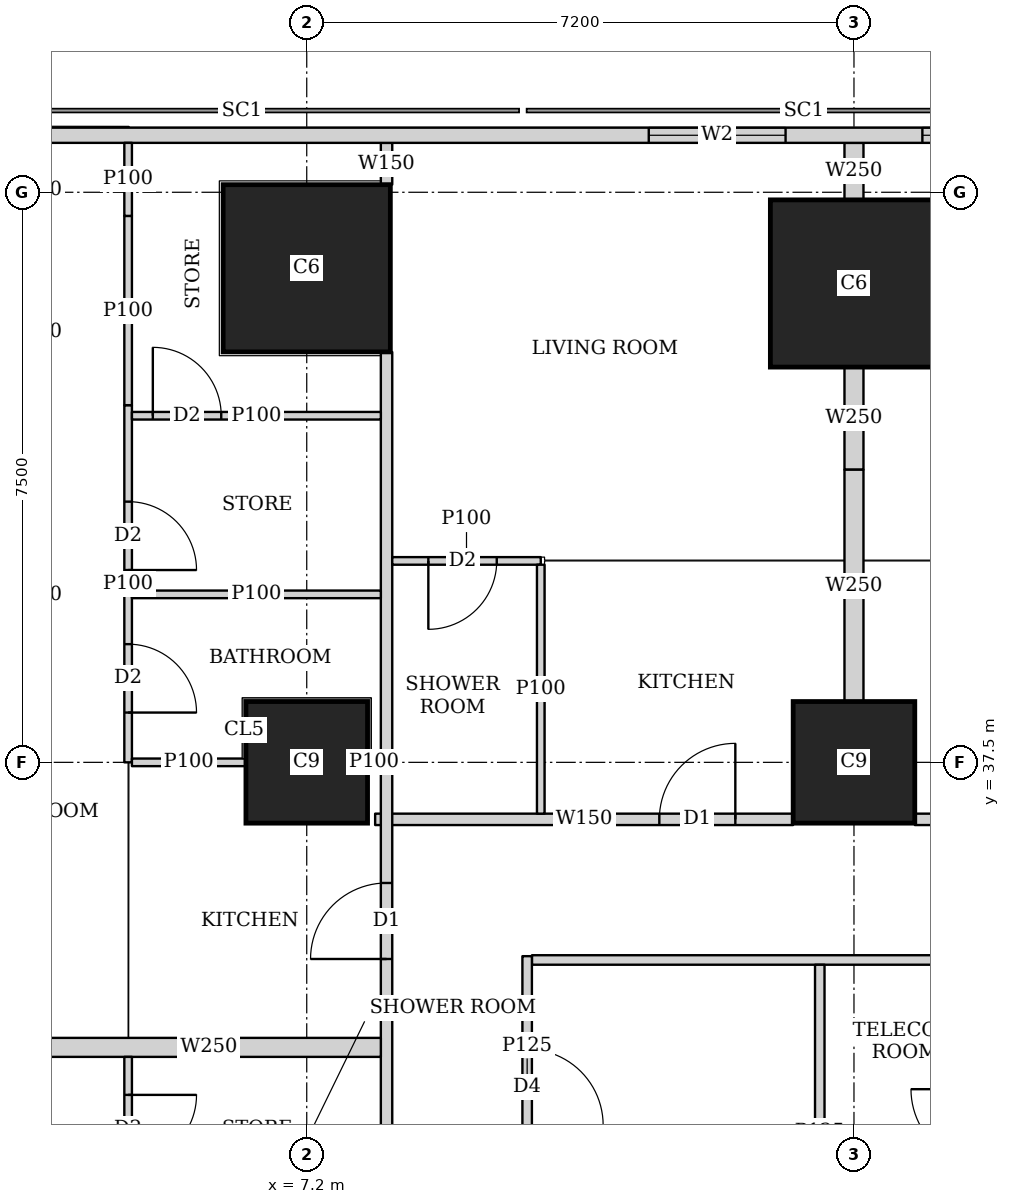
"""IFC4 building model, lengths in metres.
Left out: names, types, materials, properties, quantities, classifications, styles, units other than length and angle.
Written with IfcOpenShell. Run it as: python <this file> out.ifc"""

import sys

from ifc_helpers import new_model, si_unit, direction, frame, frame_2d, origin, origin_2d, place, context, subcontext, project, spatial, rectangle, extrude, element, fill, save


model = new_model("IFC4")
c1 = context("Model", 3, precision=1e-05, world=origin(), true_north=direction((0.0, 1.0)))
c2 = subcontext(c1, "Body", "Model", "MODEL_VIEW")
j1 = project(units=[si_unit("LENGTHUNIT", "METRE"), si_unit("PLANEANGLEUNIT", "RADIAN")], contexts=[c1])
p1 = place(None, origin())
s1 = spatial("IfcSite", under=j1, at=p1, CompositionType="ELEMENT")
p2 = place(p1, origin())
s2 = spatial("IfcBuilding", under=s1, at=p2, CompositionType="ELEMENT")
p3 = place(p2, frame((0.0, 0.0, 77.9)))
s3 = spatial("IfcBuildingStorey", under=s2, at=p3, CompositionType="ELEMENT", Elevation=77.9)
for number, where, z_axis, x_axis in (
    (1, (7.2, 37.5, 0.0), (0.0, 0.0, 1.0), (1.0, 0.0, 0.0)),
    (2, (14.4, 37.5, 0.0), (0.0, 0.0, 1.0), (1.0, 0.0, 0.0)),
):
    element("IfcColumn", number, at=place(p3, frame(where, z_axis=z_axis, x_axis=x_axis)), inside=s3, PredefinedType="COLUMN", context=c2, shape_type="SweptSolid", body=[
        extrude(rectangle(XDim=1.6, YDim=1.6, at=origin_2d()), origin(), (0.0, 0.0, 1.0), 3.75),
    ])
for number, where, z_axis, x_axis in (
    (3, (7.2, 44.0, 0.0), (0.0, 0.0, 1.0), (1.0, 0.0, 0.0)),
    (4, (14.4, 43.8, 0.0), (0.0, 0.0, 1.0), (1.0, 0.0, 0.0)),
):
    element("IfcColumn", number, at=place(p3, frame(where, z_axis=z_axis, x_axis=x_axis)), inside=s3, PredefinedType="COLUMN", context=c2, shape_type="SweptSolid", body=[
        extrude(rectangle(XDim=2.2, YDim=2.2, at=origin_2d()), origin(), (0.0, 0.0, 1.0), 3.75),
    ])
p4 = place(p3, frame((40.106, 45.75, 0.0), z_axis=(0.0, 0.0, 1.0), x_axis=(-1.0, 0.0, 0.0)))
e5 = element("IfcWall", 5, at=p4, inside=s3, PredefinedType="SOLIDWALL", context=c2, shape_type="SweptSolid", body=[
    extrude(rectangle(XDim=37.943, YDim=0.2, at=frame_2d((18.971, 0.0))), origin(), (0.0, 0.0, 1.0), 3.5),
])
p5 = place(p4, frame((8.606, 0.0, 0.9)))
e6 = element("IfcOpeningElement", 6, at=p5, cuts=e5, PredefinedType="OPENING", context=c2, shape_type="SweptSolid", body=[
    extrude(rectangle(XDim=1.8, YDim=1.5, at=frame_2d((0.9, 0.75))), frame((0.0, 0.11, 0.0), z_axis=(0.0, -1.0, 0.0), x_axis=(1.0, 0.0, 0.0)), (0.0, 0.0, 1.0), 0.22),
])
p6 = place(p4, frame((12.206, 0.0, 0.9)))
e7 = element("IfcOpeningElement", 7, at=p6, cuts=e5, PredefinedType="OPENING", context=c2, shape_type="SweptSolid", body=[
    extrude(rectangle(XDim=1.8, YDim=1.5, at=frame_2d((0.9, 0.75))), frame((0.0, 0.11, 0.0), z_axis=(0.0, -1.0, 0.0), x_axis=(1.0, 0.0, 0.0)), (0.0, 0.0, 1.0), 0.22),
])
p7 = place(p4, frame((15.806, 0.0, 0.9)))
e8 = element("IfcOpeningElement", 8, at=p7, cuts=e5, PredefinedType="OPENING", context=c2, shape_type="SweptSolid", body=[
    extrude(rectangle(XDim=1.8, YDim=1.5, at=frame_2d((0.9, 0.75))), frame((0.0, 0.11, 0.0), z_axis=(0.0, -1.0, 0.0), x_axis=(1.0, 0.0, 0.0)), (0.0, 0.0, 1.0), 0.22),
])
p8 = place(p4, frame((19.406, 0.0, 0.9)))
e9 = element("IfcOpeningElement", 9, at=p8, cuts=e5, PredefinedType="OPENING", context=c2, shape_type="SweptSolid", body=[
    extrude(rectangle(XDim=1.8, YDim=1.5, at=frame_2d((0.9, 0.75))), frame((0.0, 0.11, 0.0), z_axis=(0.0, -1.0, 0.0), x_axis=(1.0, 0.0, 0.0)), (0.0, 0.0, 1.0), 0.22),
])
p9 = place(p4, frame((23.006, 0.0, 0.9)))
e10 = element("IfcOpeningElement", 10, at=p9, cuts=e5, PredefinedType="OPENING", context=c2, shape_type="SweptSolid", body=[
    extrude(rectangle(XDim=1.8, YDim=1.5, at=frame_2d((0.9, 0.75))), frame((0.0, 0.11, 0.0), z_axis=(0.0, -1.0, 0.0), x_axis=(1.0, 0.0, 0.0)), (0.0, 0.0, 1.0), 0.22),
])
p10 = place(p4, frame((26.606, 0.0, 0.9)))
e11 = element("IfcOpeningElement", 11, at=p10, cuts=e5, PredefinedType="OPENING", context=c2, shape_type="SweptSolid", body=[
    extrude(rectangle(XDim=1.8, YDim=1.5, at=frame_2d((0.9, 0.75))), frame((0.0, 0.11, 0.0), z_axis=(0.0, -1.0, 0.0), x_axis=(1.0, 0.0, 0.0)), (0.0, 0.0, 1.0), 0.22),
])
p11 = place(p3, frame((8.25, 2.126, 0.0), z_axis=(0.0, 0.0, 1.0), x_axis=(0.0, 1.0, 0.0)))
e12 = element("IfcWall", 12, at=p11, inside=s3, PredefinedType="SOLIDWALL", context=c2, shape_type="SweptSolid", body=[
    extrude(rectangle(XDim=40.773, YDim=0.15, at=frame_2d((20.386, 0.0))), origin(), (0.0, 0.0, 1.0), 3.5),
])
p12 = place(p11, frame((17.787, 0.0, 0.0)))
e13 = element("IfcOpeningElement", 13, at=p12, cuts=e12, PredefinedType="OPENING", context=c2, shape_type="SweptSolid", body=[
    extrude(rectangle(XDim=1.0, YDim=2.1, at=frame_2d((0.5, 1.05))), frame((0.0, 0.085, 0.0), z_axis=(0.0, -1.0, 0.0), x_axis=(1.0, 0.0, 0.0)), (0.0, 0.0, 1.0), 0.17),
])
p13 = place(p11, frame((21.962, 0.0, 0.0)))
e14 = element("IfcOpeningElement", 14, at=p13, cuts=e12, PredefinedType="OPENING", context=c2, shape_type="SweptSolid", body=[
    extrude(rectangle(XDim=1.0, YDim=2.1, at=frame_2d((0.5, 1.05))), frame((0.0, 0.085, 0.0), z_axis=(0.0, -1.0, 0.0), x_axis=(1.0, 0.0, 0.0)), (0.0, 0.0, 1.0), 0.17),
])
p14 = place(p11, frame((32.787, 0.0, 0.0)))
e15 = element("IfcOpeningElement", 15, at=p14, cuts=e12, PredefinedType="OPENING", context=c2, shape_type="SweptSolid", body=[
    extrude(rectangle(XDim=1.0, YDim=2.1, at=frame_2d((0.5, 1.05))), frame((0.0, 0.085, 0.0), z_axis=(0.0, -1.0, 0.0), x_axis=(1.0, 0.0, 0.0)), (0.0, 0.0, 1.0), 0.17),
])
p15 = place(p3, frame((8.25, 45.101, 0.0), z_axis=(0.0, 0.0, 1.0), x_axis=(0.0, 1.0, 0.0)))
e16 = element("IfcWall", 16, at=p15, inside=s3, PredefinedType="SOLIDWALL", context=c2, shape_type="SweptSolid", body=[
    extrude(rectangle(XDim=0.549, YDim=0.15, at=frame_2d((0.274, 0.0))), origin(), (0.0, 0.0, 1.0), 3.5),
])
p16 = place(p3, frame((8.1, 36.75, 0.0), z_axis=(0.0, 0.0, 1.0), x_axis=(1.0, 0.0, 0.0)))
e17 = element("IfcWall", 17, at=p16, inside=s3, PredefinedType="SOLIDWALL", context=c2, shape_type="SweptSolid", body=[
    extrude(rectangle(XDim=5.499, YDim=0.15, at=frame_2d((2.75, 0.0))), origin(), (0.0, 0.0, 1.0), 3.5),
])
p17 = place(p16, frame((3.739, 0.0, 0.0)))
e18 = element("IfcOpeningElement", 18, at=p17, cuts=e17, PredefinedType="OPENING", context=c2, shape_type="SweptSolid", body=[
    extrude(rectangle(XDim=1.0, YDim=2.1, at=frame_2d((0.5, 1.05))), frame((0.0, 0.085, 0.0), z_axis=(0.0, -1.0, 0.0), x_axis=(1.0, 0.0, 0.0)), (0.0, 0.0, 1.0), 0.17),
])
p18 = place(p3, frame((15.201, 36.75, 0.0), z_axis=(0.0, 0.0, 1.0), x_axis=(1.0, 0.0, 0.0)))
e19 = element("IfcWall", 19, at=p18, inside=s3, PredefinedType="SOLIDWALL", context=c2, shape_type="SweptSolid", body=[
    extrude(rectangle(XDim=5.398, YDim=0.15, at=frame_2d((2.699, 0.0))), origin(), (0.0, 0.0, 1.0), 3.5),
])
p19 = place(p18, frame((0.699, 0.0, 0.0)))
e20 = element("IfcOpeningElement", 20, at=p19, cuts=e19, PredefinedType="OPENING", context=c2, shape_type="SweptSolid", body=[
    extrude(rectangle(XDim=1.0, YDim=2.1, at=frame_2d((0.5, 1.05))), frame((0.0, 0.085, 0.0), z_axis=(0.0, -1.0, 0.0), x_axis=(1.0, 0.0, 0.0)), (0.0, 0.0, 1.0), 0.17),
])
p20 = place(p3, frame((4.85, 26.25, 0.0), z_axis=(0.0, 0.0, 1.0), x_axis=(0.0, 1.0, 0.0)))
e21 = element("IfcWall", 21, at=p20, inside=s3, PredefinedType="PARTITIONING", context=c2, shape_type="SweptSolid", body=[
    extrude(rectangle(XDim=7.375, YDim=0.1, at=frame_2d((3.688, 0.0))), origin(), (0.0, 0.0, 1.0), 3.5),
])
p21 = place(p20, frame((0.655, 0.0, 0.0)))
e22 = element("IfcOpeningElement", 22, at=p21, cuts=e21, PredefinedType="OPENING", context=c2, shape_type="SweptSolid", body=[
    extrude(rectangle(XDim=0.9, YDim=2.1, at=frame_2d((0.45, 1.05))), frame((0.0, 0.06, 0.0), z_axis=(0.0, -1.0, 0.0), x_axis=(1.0, 0.0, 0.0)), (0.0, 0.0, 1.0), 0.12),
])
p22 = place(p20, frame((4.1, 0.0, 0.0)))
e23 = element("IfcOpeningElement", 23, at=p22, cuts=e21, PredefinedType="OPENING", context=c2, shape_type="SweptSolid", body=[
    extrude(rectangle(XDim=0.9, YDim=2.1, at=frame_2d((0.45, 1.05))), frame((0.0, 0.06, 0.0), z_axis=(0.0, -1.0, 0.0), x_axis=(1.0, 0.0, 0.0)), (0.0, 0.0, 1.0), 0.12),
])
p23 = place(p20, frame((2.53, 0.0, 0.0)))
e24 = element("IfcOpeningElement", 24, at=p23, cuts=e21, PredefinedType="OPENING", context=c2, shape_type="SweptSolid", body=[
    extrude(rectangle(XDim=0.9, YDim=2.1, at=frame_2d((0.45, 1.05))), frame((0.0, 0.06, 0.0), z_axis=(0.0, -1.0, 0.0), x_axis=(1.0, 0.0, 0.0)), (0.0, 0.0, 1.0), 0.12),
])
p24 = place(p20, frame((5.975, 0.0, 0.0)))
e25 = element("IfcOpeningElement", 25, at=p24, cuts=e21, PredefinedType="OPENING", context=c2, shape_type="SweptSolid", body=[
    extrude(rectangle(XDim=0.9, YDim=2.1, at=frame_2d((0.45, 1.05))), frame((0.0, 0.06, 0.0), z_axis=(0.0, -1.0, 0.0), x_axis=(1.0, 0.0, 0.0)), (0.0, 0.0, 1.0), 0.12),
])
p25 = place(p3, frame((4.85, 37.5, 0.0), z_axis=(0.0, 0.0, 1.0), x_axis=(0.0, 1.0, 0.0)))
e26 = element("IfcWall", 26, at=p25, inside=s3, PredefinedType="PARTITIONING", context=c2, shape_type="SweptSolid", body=[
    extrude(rectangle(XDim=4.699, YDim=0.1, at=frame_2d((2.35, 0.0))), origin(), (0.0, 0.0, 1.0), 3.5),
])
p26 = place(p25, frame((0.655, 0.0, 0.0)))
e27 = element("IfcOpeningElement", 27, at=p26, cuts=e26, PredefinedType="OPENING", context=c2, shape_type="SweptSolid", body=[
    extrude(rectangle(XDim=0.9, YDim=2.1, at=frame_2d((0.45, 1.05))), frame((0.0, 0.06, 0.0), z_axis=(0.0, -1.0, 0.0), x_axis=(1.0, 0.0, 0.0)), (0.0, 0.0, 1.0), 0.12),
])
p27 = place(p25, frame((2.53, 0.0, 0.0)))
e28 = element("IfcOpeningElement", 28, at=p27, cuts=e26, PredefinedType="OPENING", context=c2, shape_type="SweptSolid", body=[
    extrude(rectangle(XDim=0.9, YDim=2.1, at=frame_2d((0.45, 1.05))), frame((0.0, 0.06, 0.0), z_axis=(0.0, -1.0, 0.0), x_axis=(1.0, 0.0, 0.0)), (0.0, 0.0, 1.0), 0.12),
])
p28 = place(p3, frame((4.85, 42.199, 0.0), z_axis=(0.0, 0.0, 1.0), x_axis=(0.0, 1.0, 0.0)))
e29 = element("IfcWall", 29, at=p28, inside=s3, PredefinedType="PARTITIONING", context=c2, shape_type="SweptSolid", body=[
    extrude(rectangle(XDim=2.49, YDim=0.1, at=frame_2d((1.245, 0.0))), origin(), (0.0, 0.0, 1.0), 2.05),
])
p29 = place(p3, frame((4.85, 44.689, 0.0), z_axis=(0.0, 0.0, 1.0), x_axis=(0.0, 1.0, 0.0)))
e30 = element("IfcWall", 30, at=p29, inside=s3, PredefinedType="PARTITIONING", context=c2, shape_type="SweptSolid", body=[
    extrude(rectangle(XDim=0.961, YDim=0.1, at=frame_2d((0.48, 0.0))), origin(), (0.0, 0.0, 1.0), 3.5),
])
p30 = place(p3, frame((4.9, 37.5, 0.0), z_axis=(0.0, 0.0, 1.0), x_axis=(1.0, 0.0, 0.0)))
e31 = element("IfcWall", 31, at=p30, inside=s3, PredefinedType="PARTITIONING", context=c2, shape_type="SweptSolid", body=[
    extrude(rectangle(XDim=1.499, YDim=0.1, at=frame_2d((0.75, 0.0))), origin(), (0.0, 0.0, 1.0), 3.5),
])
p31 = place(p3, frame((8.001, 37.5, 0.0), z_axis=(0.0, 0.0, 1.0), x_axis=(1.0, 0.0, 0.0)))
e32 = element("IfcWall", 32, at=p31, inside=s3, PredefinedType="PARTITIONING", context=c2, shape_type="SweptSolid", body=[
    extrude(rectangle(XDim=0.174, YDim=0.1, at=frame_2d((0.087, 0.0))), origin(), (0.0, 0.0, 1.0), 3.5),
])
p32 = place(p3, frame((4.9, 39.71, 0.0), z_axis=(0.0, 0.0, 1.0), x_axis=(1.0, 0.0, 0.0)))
e33 = element("IfcWall", 33, at=p32, inside=s3, PredefinedType="PARTITIONING", context=c2, shape_type="SweptSolid", body=[
    extrude(rectangle(XDim=3.275, YDim=0.1, at=frame_2d((1.638, 0.0))), origin(), (0.0, 0.0, 1.0), 3.5),
])
p33 = place(p3, frame((3.65, 33.75, 0.0), z_axis=(0.0, 0.0, 1.0), x_axis=(1.0, 0.0, 0.0)))
e34 = element("IfcWall", 34, at=p33, inside=s3, PredefinedType="SOLIDWALL", context=c2, shape_type="SweptSolid", body=[
    extrude(rectangle(XDim=4.525, YDim=0.25, at=frame_2d((2.263, 0.0))), origin(), (0.0, 0.0, 1.0), 3.5),
])
p34 = place(p3, frame((8.325, 40.15, 0.0), z_axis=(0.0, 0.0, 1.0), x_axis=(1.0, 0.0, 0.0)))
e35 = element("IfcWall", 35, at=p34, inside=s3, PredefinedType="PARTITIONING", context=c2, shape_type="SweptSolid", body=[
    extrude(rectangle(XDim=1.954, YDim=0.1, at=frame_2d((0.977, 0.0))), origin(), (0.0, 0.0, 1.0), 3.5),
])
p35 = place(p34, frame((0.475, 0.0, 0.0)))
e36 = element("IfcOpeningElement", 36, at=p35, cuts=e35, PredefinedType="OPENING", context=c2, shape_type="SweptSolid", body=[
    extrude(rectangle(XDim=0.9, YDim=2.1, at=frame_2d((0.45, 1.05))), frame((0.0, 0.06, 0.0), z_axis=(0.0, -1.0, 0.0), x_axis=(1.0, 0.0, 0.0)), (0.0, 0.0, 1.0), 0.12),
])
p36 = place(p3, frame((10.279, 36.825, 0.0), z_axis=(0.0, 0.0, 1.0), x_axis=(0.0, 1.0, 0.0)))
e37 = element("IfcWall", 37, at=p36, inside=s3, PredefinedType="PARTITIONING", context=c2, shape_type="SweptSolid", body=[
    extrude(rectangle(XDim=3.275, YDim=0.1, at=frame_2d((1.638, 0.0))), origin(), (0.0, 0.0, 1.0), 3.5),
])
p37 = place(p3, frame((14.4, 41.35, 0.0), z_axis=(0.0, 0.0, 1.0), x_axis=(0.0, 1.0, 0.0)))
e38 = element("IfcWall", 38, at=p37, inside=s3, PredefinedType="SOLIDWALL", context=c2, shape_type="SweptSolid", body=[
    extrude(rectangle(XDim=1.349, YDim=0.25, at=frame_2d((0.674, 0.0))), origin(), (0.0, 0.0, 1.0), 3.5),
])
p38 = place(p3, frame((14.4, 44.901, 0.0), z_axis=(0.0, 0.0, 1.0), x_axis=(0.0, 1.0, 0.0)))
e39 = element("IfcWall", 39, at=p38, inside=s3, PredefinedType="SOLIDWALL", context=c2, shape_type="SweptSolid", body=[
    extrude(rectangle(XDim=0.749, YDim=0.25, at=frame_2d((0.375, 0.0))), origin(), (0.0, 0.0, 1.0), 3.5),
])
p39 = place(p3, frame((14.4, 38.301, 0.0), z_axis=(0.0, 0.0, 1.0), x_axis=(0.0, 1.0, 0.0)))
e40 = element("IfcWall", 40, at=p39, inside=s3, PredefinedType="SOLIDWALL", context=c2, shape_type="SweptSolid", body=[
    extrude(rectangle(XDim=3.049, YDim=0.25, at=frame_2d((1.524, 0.0))), origin(), (0.0, 0.0, 1.0), 3.5),
])
p40 = place(p3, frame((8.175, 42.06, 0.0), z_axis=(0.0, 0.0, 1.0), x_axis=(-1.0, 0.0, 0.0)))
e41 = element("IfcWall", 41, at=p40, inside=s3, PredefinedType="PARTITIONING", context=c2, shape_type="SweptSolid", body=[
    extrude(rectangle(XDim=3.275, YDim=0.1, at=frame_2d((1.638, 0.0))), origin(), (0.0, 0.0, 1.0), 3.5),
])
p41 = place(p40, frame((2.1, 0.0, 0.0)))
e42 = element("IfcOpeningElement", 42, at=p41, cuts=e41, PredefinedType="OPENING", context=c2, shape_type="SweptSolid", body=[
    extrude(rectangle(XDim=0.9, YDim=2.1, at=frame_2d((0.45, 1.05))), frame((0.0, 0.06, 0.0), z_axis=(0.0, -1.0, 0.0), x_axis=(1.0, 0.0, 0.0)), (0.0, 0.0, 1.0), 0.12),
])
p42 = place(p3, frame((10.1, 31.5, 0.0), z_axis=(0.0, 0.0, 1.0), x_axis=(0.0, 1.0, 0.0)))
e43 = element("IfcWall", 43, at=p42, inside=s3, PredefinedType="PARTITIONING", context=c2, shape_type="SweptSolid", body=[
    extrude(rectangle(XDim=3.45, YDim=0.125, at=frame_2d((1.725, 0.0))), origin(), (0.0, 0.0, 1.0), 3.5),
])
p43 = place(p42, frame((1.225, 0.0, 0.0)))
e44 = element("IfcOpeningElement", 44, at=p43, cuts=e43, PredefinedType="OPENING", context=c2, shape_type="SweptSolid", body=[
    extrude(rectangle(XDim=1.0, YDim=2.1, at=frame_2d((0.5, 1.05))), frame((0.0, 0.073, 0.0), z_axis=(0.0, -1.0, 0.0), x_axis=(1.0, 0.0, 0.0)), (0.0, 0.0, 1.0), 0.145),
])
p44 = place(p3, frame((13.95, 30.45, 0.0), z_axis=(0.0, 0.0, 1.0), x_axis=(0.0, 1.0, 0.0)))
e45 = element("IfcWall", 45, at=p44, inside=s3, PredefinedType="PARTITIONING", context=c2, shape_type="SweptSolid", body=[
    extrude(rectangle(XDim=4.387, YDim=0.125, at=frame_2d((2.193, 0.0))), origin(), (0.0, 0.0, 1.0), 3.5),
])
p45 = place(p3, frame((10.163, 34.9, 0.0), z_axis=(0.0, 0.0, 1.0), x_axis=(1.0, 0.0, 0.0)))
e46 = element("IfcWall", 46, at=p45, inside=s3, PredefinedType="PARTITIONING", context=c2, shape_type="SweptSolid", body=[
    extrude(rectangle(XDim=11.287, YDim=0.125, at=frame_2d((5.644, 0.0))), origin(), (0.0, 0.0, 1.0), 3.5),
])
p46 = place(p45, frame((7.737, 0.0, 0.0)))
e47 = element("IfcOpeningElement", 47, at=p46, cuts=e46, PredefinedType="OPENING", context=c2, shape_type="SweptSolid", body=[
    extrude(rectangle(XDim=1.8, YDim=2.1, at=frame_2d((0.9, 1.05))), frame((0.0, 0.073, 0.0), z_axis=(0.0, -1.0, 0.0), x_axis=(1.0, 0.0, 0.0)), (0.0, 0.0, 1.0), 0.145),
])
p47 = place(p9, origin())
e48 = element("IfcWindow", 48, at=p47, inside=s3, PartitioningType="SINGLE_PANEL", PredefinedType="WINDOW", context=c2, shape_type="SweptSolid", body=[
    extrude(rectangle(XDim=1.8, YDim=1.5, at=frame_2d((0.9, 0.75))), frame((0.0, 0.03, 0.0), z_axis=(0.0, -1.0, 0.0), x_axis=(1.0, 0.0, 0.0)), (0.0, 0.0, 1.0), 0.06),
])
fill(e10, e48)
p48 = place(p10, origin())
e49 = element("IfcWindow", 49, at=p48, inside=s3, PartitioningType="SINGLE_PANEL", PredefinedType="WINDOW", context=c2, shape_type="SweptSolid", body=[
    extrude(rectangle(XDim=1.8, YDim=1.5, at=frame_2d((0.9, 0.75))), frame((0.0, 0.03, 0.0), z_axis=(0.0, -1.0, 0.0), x_axis=(1.0, 0.0, 0.0)), (0.0, 0.0, 1.0), 0.06),
])
fill(e11, e49)
p49 = place(p24, origin())
e50 = element("IfcDoor", 50, at=p49, inside=s3, OperationType="SINGLE_SWING_LEFT", PredefinedType="DOOR", context=c2, shape_type="SweptSolid", body=[
    extrude(rectangle(XDim=0.9, YDim=2.1, at=frame_2d((0.45, 1.05))), frame((0.0, 0.025, 0.0), z_axis=(0.0, -1.0, 0.0), x_axis=(1.0, 0.0, 0.0)), (0.0, 0.0, 1.0), 0.05),
])
fill(e25, e50)
p50 = place(p26, origin())
e51 = element("IfcDoor", 51, at=p50, inside=s3, OperationType="SINGLE_SWING_RIGHT", PredefinedType="DOOR", context=c2, shape_type="SweptSolid", body=[
    extrude(rectangle(XDim=0.9, YDim=2.1, at=frame_2d((0.45, 1.05))), frame((0.0, 0.025, 0.0), z_axis=(0.0, -1.0, 0.0), x_axis=(1.0, 0.0, 0.0)), (0.0, 0.0, 1.0), 0.05),
])
fill(e27, e51)
p51 = place(p27, origin())
e52 = element("IfcDoor", 52, at=p51, inside=s3, OperationType="SINGLE_SWING_RIGHT", PredefinedType="DOOR", context=c2, shape_type="SweptSolid", body=[
    extrude(rectangle(XDim=0.9, YDim=2.1, at=frame_2d((0.45, 1.05))), frame((0.0, 0.025, 0.0), z_axis=(0.0, -1.0, 0.0), x_axis=(1.0, 0.0, 0.0)), (0.0, 0.0, 1.0), 0.05),
])
fill(e28, e52)
p52 = place(p14, origin())
e53 = element("IfcDoor", 53, at=p52, inside=s3, OperationType="SINGLE_SWING_LEFT", PredefinedType="DOOR", context=c2, shape_type="SweptSolid", body=[
    extrude(rectangle(XDim=1.0, YDim=2.1, at=frame_2d((0.5, 1.05))), frame((0.0, 0.025, 0.0), z_axis=(0.0, -1.0, 0.0), x_axis=(1.0, 0.0, 0.0)), (0.0, 0.0, 1.0), 0.05),
])
fill(e15, e53)
p53 = place(p35, origin())
e54 = element("IfcDoor", 54, at=p53, inside=s3, OperationType="SINGLE_SWING_RIGHT", PredefinedType="DOOR", context=c2, shape_type="SweptSolid", body=[
    extrude(rectangle(XDim=0.9, YDim=2.1, at=frame_2d((0.45, 1.05))), frame((0.0, 0.025, 0.0), z_axis=(0.0, -1.0, 0.0), x_axis=(1.0, 0.0, 0.0)), (0.0, 0.0, 1.0), 0.05),
])
fill(e36, e54)
p54 = place(p17, origin())
e55 = element("IfcDoor", 55, at=p54, inside=s3, OperationType="SINGLE_SWING_RIGHT", PredefinedType="DOOR", context=c2, shape_type="SweptSolid", body=[
    extrude(rectangle(XDim=1.0, YDim=2.1, at=frame_2d((0.5, 1.05))), frame((0.0, 0.025, 0.0), z_axis=(0.0, -1.0, 0.0), x_axis=(1.0, 0.0, 0.0)), (0.0, 0.0, 1.0), 0.05),
])
fill(e18, e55)
p55 = place(p41, origin())
e56 = element("IfcDoor", 56, at=p55, inside=s3, OperationType="SINGLE_SWING_LEFT", PredefinedType="DOOR", context=c2, shape_type="SweptSolid", body=[
    extrude(rectangle(XDim=0.9, YDim=2.1, at=frame_2d((0.45, 1.05))), frame((0.0, 0.025, 0.0), z_axis=(0.0, -1.0, 0.0), x_axis=(1.0, 0.0, 0.0)), (0.0, 0.0, 1.0), 0.05),
])
fill(e42, e56)
p56 = place(p43, origin())
e57 = element("IfcDoor", 57, at=p56, inside=s3, OperationType="SINGLE_SWING_RIGHT", PredefinedType="DOOR", context=c2, shape_type="SweptSolid", body=[
    extrude(rectangle(XDim=1.0, YDim=2.1, at=frame_2d((0.5, 1.05))), frame((0.0, 0.025, 0.0), z_axis=(0.0, -1.0, 0.0), x_axis=(1.0, 0.0, 0.0)), (0.0, 0.0, 1.0), 0.05),
])
fill(e44, e57)
save(model, sys.argv[1])
